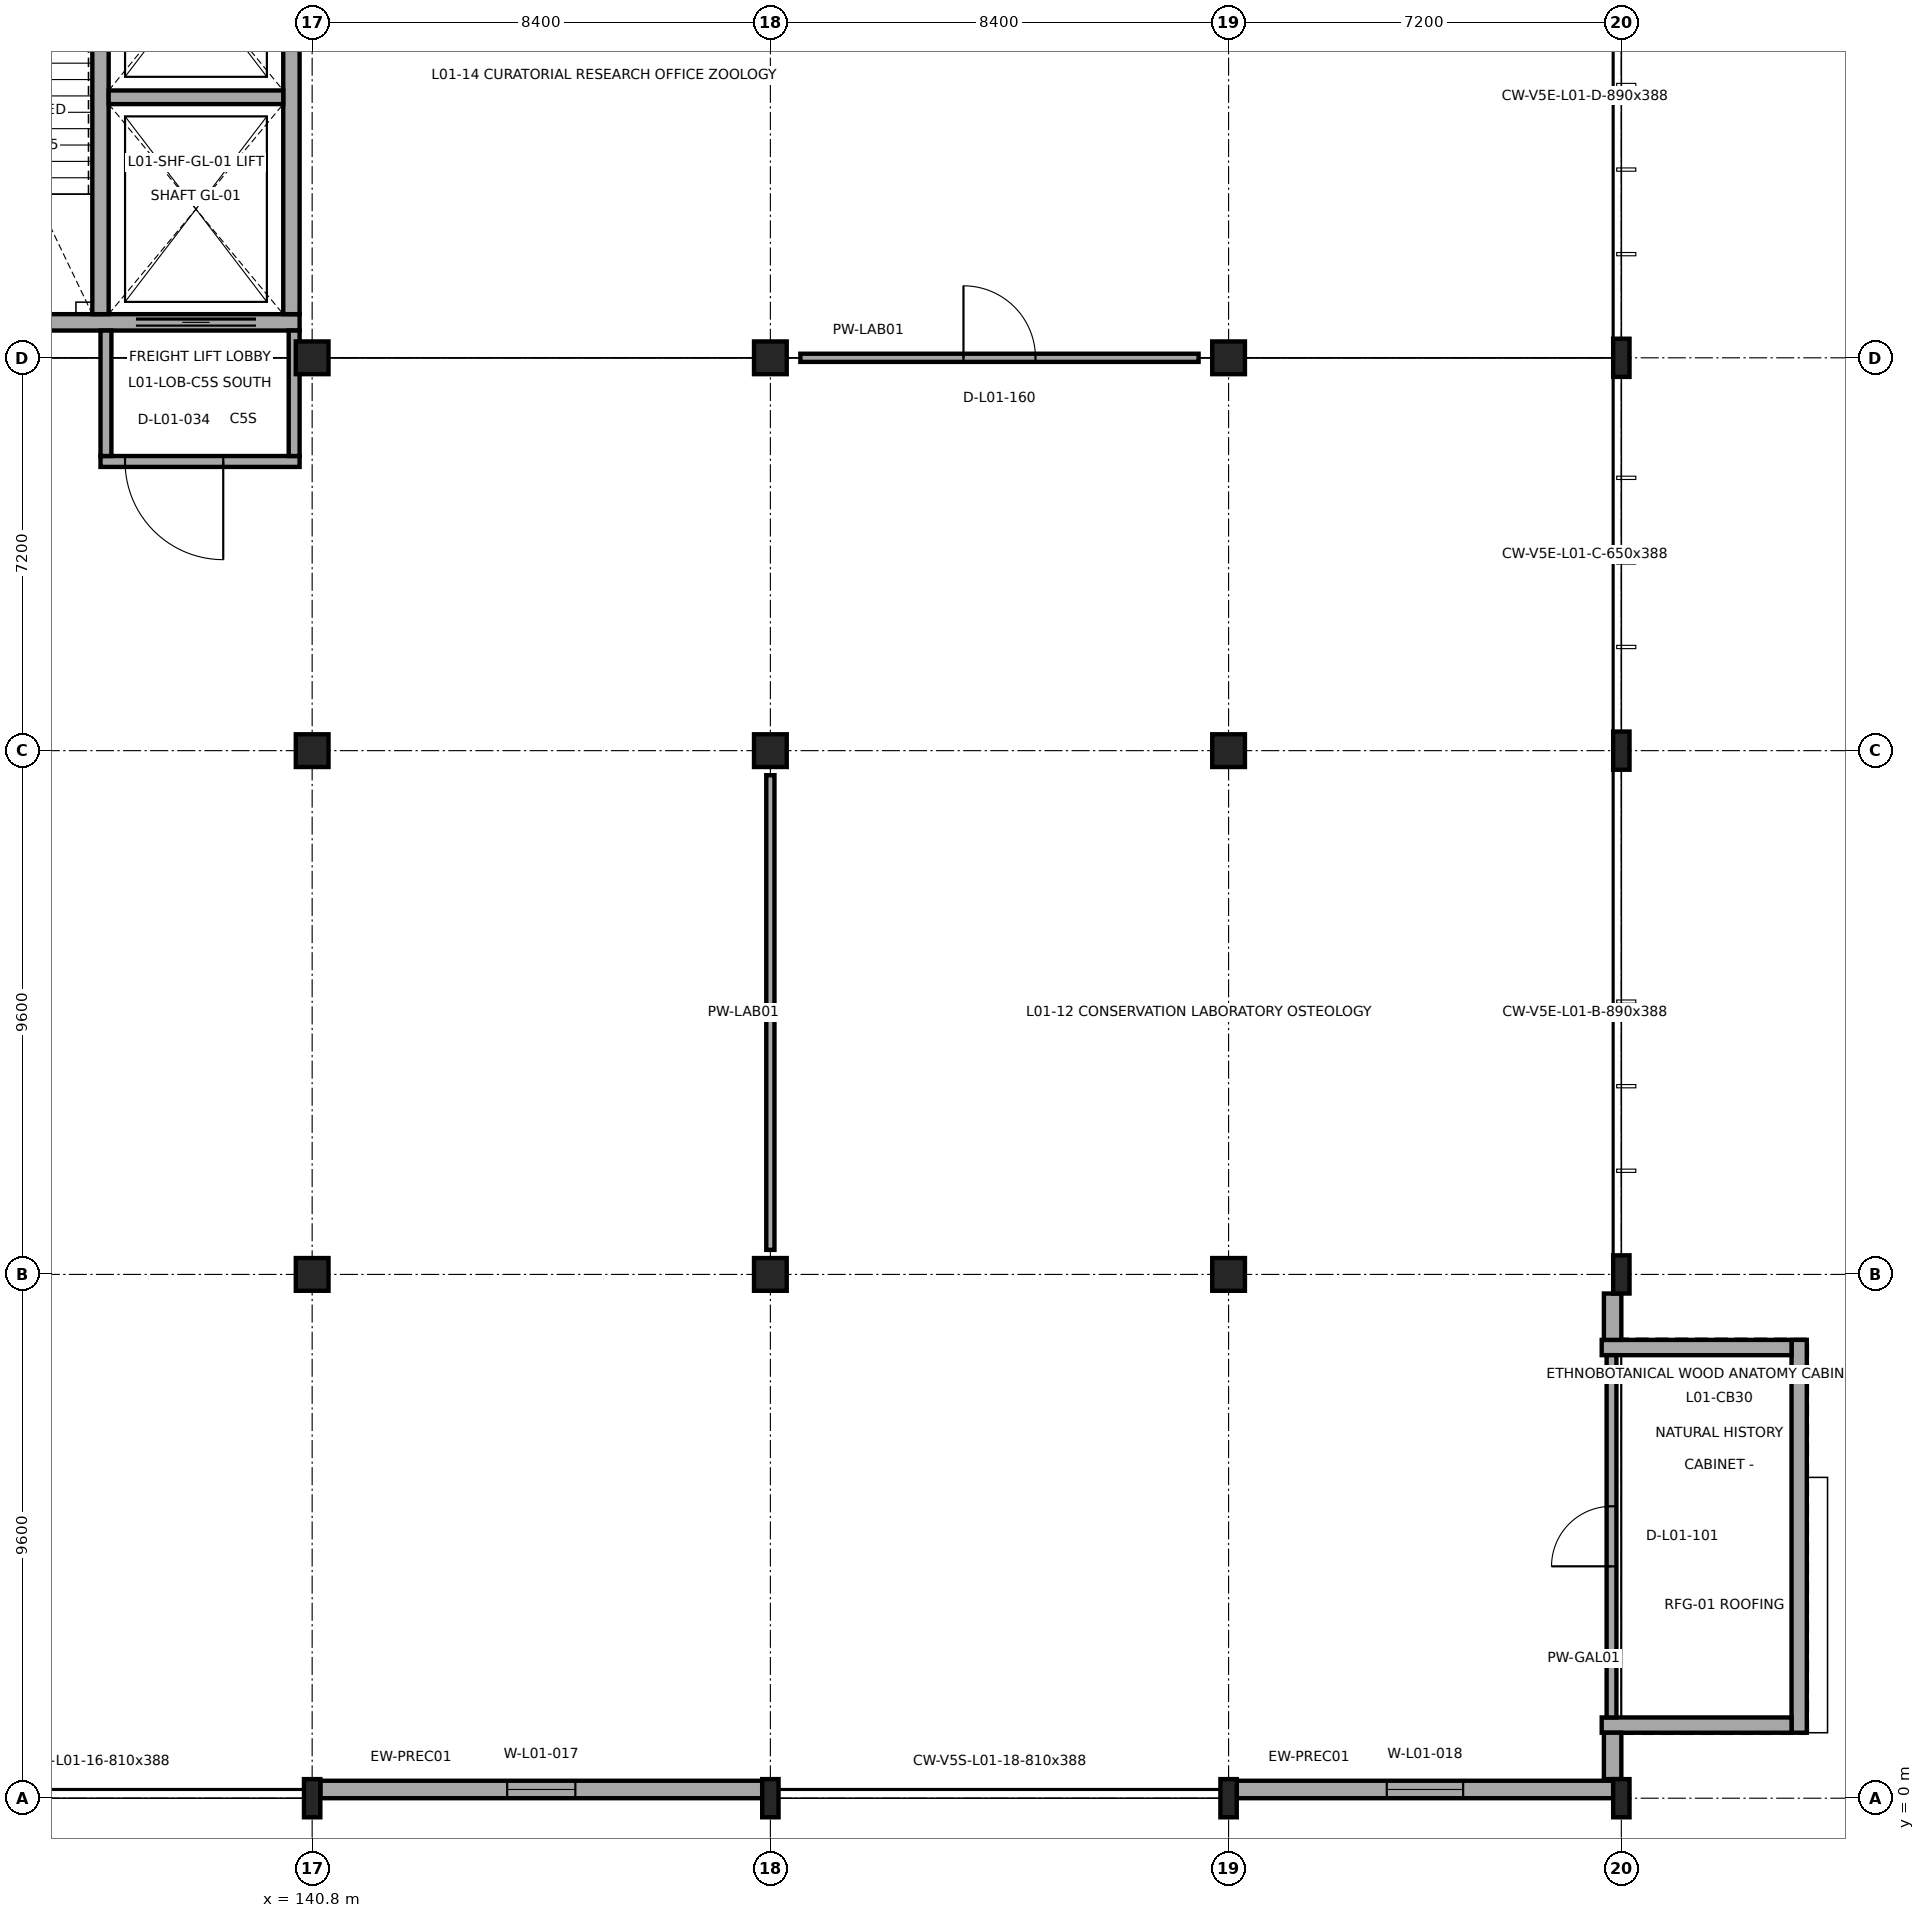
"""IFC4 building model, lengths in metres.
Left out: names, types, materials, properties, quantities, classifications, styles, units other than length and angle.
Written with IfcOpenShell. Run it as: python <this file> out.ifc"""

import sys

from ifc_helpers import new_model, si_unit, direction, frame, frame_2d, origin, origin_2d, place, context, subcontext, project, spatial, rectangle, i_section, extrude, element, fill, save


model = new_model("IFC4")
c1 = context("Model", 3, precision=1e-05, world=origin(), true_north=direction((0.0, 1.0)))
c2 = subcontext(c1, "Body", "Model", "MODEL_VIEW")
j1 = project(units=[si_unit("LENGTHUNIT", "METRE"), si_unit("PLANEANGLEUNIT", "RADIAN")], contexts=[c1])
p1 = place(None, origin())
s1 = spatial("IfcSite", under=j1, at=p1, CompositionType="ELEMENT")
p2 = place(p1, origin())
s2 = spatial("IfcBuilding", under=s1, at=p2, CompositionType="ELEMENT")
p3 = place(p2, frame((0.0, 0.0, 8.4)))
s3 = spatial("IfcBuildingStorey", under=s2, at=p3, CompositionType="ELEMENT", Elevation=8.4)
p4 = place(p3, frame((140.8, 0.0, 0.0), z_axis=(0.0, 0.0, 1.0), x_axis=(1.0, 0.0, 0.0)))
e1 = element("IfcColumn", 1, at=p4, inside=s3, PredefinedType="COLUMN", context=c2, shape_type="SweptSolid", body=[
    extrude(i_section(OverallWidth=0.3, OverallDepth=0.7, WebThickness=0.017, FlangeThickness=0.032, FilletRadius=0.027, at=origin_2d()), origin(), (0.0, 0.0, 1.0), 4.5),
])
for number, where, z_axis, x_axis in (
    (2, (140.8, 9.6, 0.0), (0.0, 0.0, 1.0), (1.0, 0.0, 0.0)),
    (3, (140.8, 19.2, 0.0), (0.0, 0.0, 1.0), (1.0, 0.0, 0.0)),
    (4, (140.8, 26.4, 0.0), (0.0, 0.0, 1.0), (1.0, 0.0, 0.0)),
):
    element("IfcColumn", number, at=place(p3, frame(where, z_axis=z_axis, x_axis=x_axis)), inside=s3, PredefinedType="COLUMN", context=c2, shape_type="SweptSolid", body=[
        extrude(rectangle(XDim=0.6, YDim=0.6, at=origin_2d()), origin(), (0.0, 0.0, 1.0), 4.5),
    ])
p5 = place(p3, frame((149.2, 0.0, 0.0), z_axis=(0.0, 0.0, 1.0), x_axis=(1.0, 0.0, 0.0)))
e5 = element("IfcColumn", 5, at=p5, inside=s3, PredefinedType="COLUMN", context=c2, shape_type="SweptSolid", body=[
    extrude(i_section(OverallWidth=0.3, OverallDepth=0.7, WebThickness=0.017, FlangeThickness=0.032, FilletRadius=0.027, at=origin_2d()), origin(), (0.0, 0.0, 1.0), 4.5),
])
for number, where, z_axis, x_axis in (
    (6, (149.2, 9.6, 0.0), (0.0, 0.0, 1.0), (1.0, 0.0, 0.0)),
    (7, (149.2, 19.2, 0.0), (0.0, 0.0, 1.0), (1.0, 0.0, 0.0)),
    (8, (149.2, 26.4, 0.0), (0.0, 0.0, 1.0), (1.0, 0.0, 0.0)),
):
    element("IfcColumn", number, at=place(p3, frame(where, z_axis=z_axis, x_axis=x_axis)), inside=s3, PredefinedType="COLUMN", context=c2, shape_type="SweptSolid", body=[
        extrude(rectangle(XDim=0.6, YDim=0.6, at=origin_2d()), origin(), (0.0, 0.0, 1.0), 4.5),
    ])
p6 = place(p3, frame((157.6, 0.0, 0.0), z_axis=(0.0, 0.0, 1.0), x_axis=(1.0, 0.0, 0.0)))
e9 = element("IfcColumn", 9, at=p6, inside=s3, PredefinedType="COLUMN", context=c2, shape_type="SweptSolid", body=[
    extrude(i_section(OverallWidth=0.3, OverallDepth=0.7, WebThickness=0.017, FlangeThickness=0.032, FilletRadius=0.027, at=origin_2d()), origin(), (0.0, 0.0, 1.0), 4.5),
])
for number, where, z_axis, x_axis in (
    (10, (157.6, 9.6, 0.0), (0.0, 0.0, 1.0), (1.0, 0.0, 0.0)),
    (11, (157.6, 19.2, 0.0), (0.0, 0.0, 1.0), (1.0, 0.0, 0.0)),
    (12, (157.6, 26.4, 0.0), (0.0, 0.0, 1.0), (1.0, 0.0, 0.0)),
):
    element("IfcColumn", number, at=place(p3, frame(where, z_axis=z_axis, x_axis=x_axis)), inside=s3, PredefinedType="COLUMN", context=c2, shape_type="SweptSolid", body=[
        extrude(rectangle(XDim=0.6, YDim=0.6, at=origin_2d()), origin(), (0.0, 0.0, 1.0), 4.5),
    ])
for number, where, z_axis, x_axis in (
    (13, (164.8, 0.0, 0.0), (0.0, 0.0, 1.0), (1.0, 0.0, 0.0)),
    (14, (164.8, 9.6, 0.0), (0.0, 0.0, 1.0), (1.0, 0.0, 0.0)),
    (15, (164.8, 19.2, 0.0), (0.0, 0.0, 1.0), (1.0, 0.0, 0.0)),
    (16, (164.8, 26.4, 0.0), (0.0, 0.0, 1.0), (1.0, 0.0, 0.0)),
):
    element("IfcColumn", number, at=place(p3, frame(where, z_axis=z_axis, x_axis=x_axis)), inside=s3, PredefinedType="COLUMN", context=c2, shape_type="SweptSolid", body=[
        extrude(i_section(OverallWidth=0.3, OverallDepth=0.7, WebThickness=0.017, FlangeThickness=0.032, FilletRadius=0.027, at=origin_2d()), origin(), (0.0, 0.0, 1.0), 4.5),
    ])
p7 = place(p3, frame((168.06, 1.2, 0.0), z_axis=(0.0, 0.0, 1.0), x_axis=(0.0, 1.0, 0.0)))
e17 = element("IfcWall", 17, at=p7, inside=s3, PredefinedType="SOLIDWALL", context=c2, shape_type="SweptSolid", body=[
    extrude(rectangle(XDim=7.2, YDim=0.28, at=frame_2d((3.6, 0.0))), origin(), (0.0, 0.0, 1.0), 2.99),
])
for number, where, z_axis, x_axis in (
    (18, (164.44, 1.34, 0.0), (0.0, 0.0, 1.0), (1.0, 0.0, 0.0)),
    (19, (167.92, 8.26, 0.0), (0.0, 0.0, 1.0), (-1.0, 0.0, 0.0)),
):
    element("IfcWall", number, at=place(p3, frame(where, z_axis=z_axis, x_axis=x_axis)), inside=s3, PredefinedType="SOLIDWALL", context=c2, shape_type="SweptSolid", body=[
        extrude(rectangle(XDim=3.48, YDim=0.28, at=frame_2d((1.74, 0.0))), origin(), (0.0, 0.0, 1.0), 2.99),
    ])
p8 = place(p3, frame((140.95, 0.16, 0.0), z_axis=(0.0, 0.0, 1.0), x_axis=(1.0, 0.0, 0.0)))
e20 = element("IfcWall", 20, at=p8, inside=s3, PredefinedType="SOLIDWALL", context=c2, shape_type="SweptSolid", body=[
    extrude(rectangle(XDim=8.1, YDim=0.32, at=frame_2d((4.05, 0.0))), origin(), (0.0, 0.0, 1.0), 3.88),
])
p9 = place(p8, frame((3.425, 0.0, 1.0)))
e21 = element("IfcOpeningElement", 21, at=p9, cuts=e20, PredefinedType="OPENING", context=c2, shape_type="SweptSolid", body=[
    extrude(rectangle(XDim=1.25, YDim=1.95, at=frame_2d((0.625, 0.975))), frame((0.0, 0.17, 0.0), z_axis=(0.0, -1.0, 0.0), x_axis=(1.0, 0.0, 0.0)), (0.0, 0.0, 1.0), 0.34),
])
p10 = place(p3, frame((157.75, 0.16, 0.0), z_axis=(0.0, 0.0, 1.0), x_axis=(1.0, 0.0, 0.0)))
e22 = element("IfcWall", 22, at=p10, inside=s3, PredefinedType="SOLIDWALL", context=c2, shape_type="SweptSolid", body=[
    extrude(rectangle(XDim=6.9, YDim=0.32, at=frame_2d((3.45, 0.0))), origin(), (0.0, 0.0, 1.0), 3.88),
])
p11 = place(p10, frame((2.75, 0.0, 1.0)))
e23 = element("IfcOpeningElement", 23, at=p11, cuts=e22, PredefinedType="OPENING", context=c2, shape_type="SweptSolid", body=[
    extrude(rectangle(XDim=1.4, YDim=1.75, at=frame_2d((0.7, 0.875))), frame((0.0, 0.17, 0.0), z_axis=(0.0, -1.0, 0.0), x_axis=(1.0, 0.0, 0.0)), (0.0, 0.0, 1.0), 0.34),
])
p12 = place(p3, frame((164.64, 0.35, 0.0), z_axis=(0.0, 0.0, 1.0), x_axis=(0.0, 1.0, 0.0)))
e24 = element("IfcWall", 24, at=p12, inside=s3, PredefinedType="SOLIDWALL", context=c2, shape_type="SweptSolid", body=[
    extrude(rectangle(XDim=0.85, YDim=0.32, at=frame_2d((0.425, 0.0))), origin(), (0.0, 0.0, 1.0), 3.88),
])
p13 = place(p3, frame((164.64, 8.4, 0.0), z_axis=(0.0, 0.0, 1.0), x_axis=(0.0, 1.0, 0.0)))
e25 = element("IfcWall", 25, at=p13, inside=s3, PredefinedType="SOLIDWALL", context=c2, shape_type="SweptSolid", body=[
    extrude(rectangle(XDim=0.85, YDim=0.32, at=frame_2d((0.425, 0.0))), origin(), (0.0, 0.0, 1.0), 3.88),
])
p14 = place(p3, frame((132.63, 27.05, 0.0), z_axis=(0.0, 0.0, 1.0), x_axis=(1.0, 0.0, 0.0)))
e26 = element("IfcWall", 26, at=p14, inside=s3, PredefinedType="SHEAR", context=c2, shape_type="SweptSolid", body=[
    extrude(rectangle(XDim=7.94, YDim=0.3, at=frame_2d((3.97, 0.0))), origin(), (0.0, 0.0, 1.0), 4.25),
])
p15 = place(p14, frame((4.94, 0.0, 0.0)))
e27 = element("IfcOpeningElement", 27, at=p15, cuts=e26, PredefinedType="OPENING", context=c2, shape_type="SweptSolid", body=[
    extrude(rectangle(XDim=2.2, YDim=2.6, at=frame_2d((1.1, 1.3))), frame((0.0, 0.16, 0.0), z_axis=(0.0, -1.0, 0.0), x_axis=(1.0, 0.0, 0.0)), (0.0, 0.0, 1.0), 0.32),
])
for number, where, z_axis, x_axis in (
    (28, (140.42, 27.2, 0.0), (0.0, 0.0, 1.0), (0.0, 1.0, 0.0)),
    (29, (136.92, 27.2, 0.0), (0.0, 0.0, 1.0), (0.0, 1.0, 0.0)),
):
    element("IfcWall", number, at=place(p3, frame(where, z_axis=z_axis, x_axis=x_axis)), inside=s3, PredefinedType="SHEAR", context=c2, shape_type="SweptSolid", body=[
        extrude(rectangle(XDim=8.0, YDim=0.3, at=frame_2d((4.0, 0.0))), origin(), (0.0, 0.0, 1.0), 4.25),
    ])
p16 = place(p3, frame((137.07, 31.175, 0.0), z_axis=(0.0, 0.0, 1.0), x_axis=(1.0, 0.0, 0.0)))
e30 = element("IfcWall", 30, at=p16, inside=s3, PredefinedType="SHEAR", context=c2, shape_type="SweptSolid", body=[
    extrude(rectangle(XDim=3.2, YDim=0.25, at=frame_2d((1.6, 0.0))), origin(), (0.0, 0.0, 1.0), 4.25),
])
p17 = place(p3, frame((140.57, 24.5, 0.0), z_axis=(0.0, 0.0, 1.0), x_axis=(-1.0, 0.0, 0.0)))
e31 = element("IfcWall", 31, at=p17, inside=s3, PredefinedType="SOLIDWALL", context=c2, shape_type="SweptSolid", body=[
    extrude(rectangle(XDim=3.65, YDim=0.2, at=frame_2d((1.825, 0.0))), origin(), (0.0, 0.0, 1.0), 4.235),
])
p18 = place(p17, frame((1.4, 0.0, 0.0)))
e32 = element("IfcOpeningElement", 32, at=p18, cuts=e31, PredefinedType="OPENING", context=c2, shape_type="SweptSolid", body=[
    extrude(rectangle(XDim=1.8, YDim=2.2, at=frame_2d((0.9, 1.1))), frame((0.0, 0.11, 0.0), z_axis=(0.0, -1.0, 0.0), x_axis=(1.0, 0.0, 0.0)), (0.0, 0.0, 1.0), 0.22),
])
for number, where, z_axis, x_axis in (
    (33, (137.02, 24.6, 0.0), (0.0, 0.0, 1.0), (0.0, 1.0, 0.0)),
    (34, (140.47, 26.9, 0.0), (0.0, 0.0, 1.0), (0.0, -1.0, 0.0)),
):
    element("IfcWall", number, at=place(p3, frame(where, z_axis=z_axis, x_axis=x_axis)), inside=s3, PredefinedType="SOLIDWALL", context=c2, shape_type="SweptSolid", body=[
        extrude(rectangle(XDim=2.3, YDim=0.2, at=frame_2d((1.15, 0.0))), origin(), (0.0, 0.0, 1.0), 3.682),
    ])
p19 = place(p3, frame((164.62, 1.48, 0.0), z_axis=(0.0, 0.0, 1.0), x_axis=(0.0, 1.0, 0.0)))
e35 = element("IfcWall", 35, at=p19, inside=s3, PredefinedType="PARTITIONING", context=c2, shape_type="SweptSolid", body=[
    extrude(rectangle(XDim=6.64, YDim=0.18, at=frame_2d((3.32, 0.0))), origin(), (0.0, 0.0, 1.0), 2.99),
])
p20 = place(p19, frame((2.77, 0.0, 0.0)))
e36 = element("IfcOpeningElement", 36, at=p20, cuts=e35, PredefinedType="OPENING", context=c2, shape_type="SweptSolid", body=[
    extrude(rectangle(XDim=1.1, YDim=2.2, at=frame_2d((0.55, 1.1))), frame((0.0, 0.1, 0.0), z_axis=(0.0, -1.0, 0.0), x_axis=(1.0, 0.0, 0.0)), (0.0, 0.0, 1.0), 0.2),
])
p21 = place(p3, frame((149.2, 10.05, 0.0), z_axis=(0.0, 0.0, 1.0), x_axis=(0.0, 1.0, 0.0)))
e37 = element("IfcWall", 37, at=p21, inside=s3, PredefinedType="PARTITIONING", context=c2, shape_type="SweptSolid", body=[
    extrude(rectangle(XDim=8.7, YDim=0.15, at=frame_2d((4.35, 0.0))), origin(), (0.0, 0.0, 1.0), 3.632),
])
p22 = place(p3, frame((149.75, 26.4, 0.0), z_axis=(0.0, 0.0, 1.0), x_axis=(1.0, 0.0, 0.0)))
e38 = element("IfcWall", 38, at=p22, inside=s3, PredefinedType="PARTITIONING", context=c2, shape_type="SweptSolid", body=[
    extrude(rectangle(XDim=7.3, YDim=0.15, at=frame_2d((3.65, 0.0))), origin(), (0.0, 0.0, 1.0), 3.682),
])
p23 = place(p22, frame((2.99, 0.0, 0.0)))
e39 = element("IfcOpeningElement", 39, at=p23, cuts=e38, PredefinedType="OPENING", context=c2, shape_type="SweptSolid", body=[
    extrude(rectangle(XDim=1.32, YDim=2.2, at=frame_2d((0.66, 1.1))), frame((0.0, 0.085, 0.0), z_axis=(0.0, -1.0, 0.0), x_axis=(1.0, 0.0, 0.0)), (0.0, 0.0, 1.0), 0.17),
])
p24 = place(p9, origin())
e40 = element("IfcWindow", 40, at=p24, inside=s3, PartitioningType="SINGLE_PANEL", PredefinedType="WINDOW", context=c2, shape_type="SweptSolid", body=[
    extrude(rectangle(XDim=1.25, YDim=1.95, at=frame_2d((0.625, 0.975))), frame((0.0, 0.03, 0.0), z_axis=(0.0, -1.0, 0.0), x_axis=(1.0, 0.0, 0.0)), (0.0, 0.0, 1.0), 0.06),
])
fill(e21, e40)
p25 = place(p11, origin())
e41 = element("IfcWindow", 41, at=p25, inside=s3, PartitioningType="SINGLE_PANEL", PredefinedType="WINDOW", context=c2, shape_type="SweptSolid", body=[
    extrude(rectangle(XDim=1.4, YDim=1.75, at=frame_2d((0.7, 0.875))), frame((0.0, 0.03, 0.0), z_axis=(0.0, -1.0, 0.0), x_axis=(1.0, 0.0, 0.0)), (0.0, 0.0, 1.0), 0.06),
])
fill(e23, e41)
p26 = place(p15, origin())
e42 = element("IfcDoor", 42, at=p26, inside=s3, OperationType="SLIDING_TO_LEFT", PredefinedType="DOOR", context=c2, shape_type="SweptSolid", body=[
    extrude(rectangle(XDim=2.2, YDim=2.6, at=frame_2d((1.1, 1.3))), frame((0.0, 0.025, 0.0), z_axis=(0.0, -1.0, 0.0), x_axis=(1.0, 0.0, 0.0)), (0.0, 0.0, 1.0), 0.05),
])
fill(e27, e42)
p27 = place(p18, origin())
e43 = element("IfcDoor", 43, at=p27, inside=s3, OperationType="DOUBLE_DOOR_SINGLE_SWING", PredefinedType="DOOR", context=c2, shape_type="SweptSolid", body=[
    extrude(rectangle(XDim=1.8, YDim=2.2, at=frame_2d((0.9, 1.1))), frame((0.0, 0.025, 0.0), z_axis=(0.0, -1.0, 0.0), x_axis=(1.0, 0.0, 0.0)), (0.0, 0.0, 1.0), 0.05),
])
fill(e32, e43)
p28 = place(p20, origin())
e44 = element("IfcDoor", 44, at=p28, inside=s3, OperationType="SINGLE_SWING_LEFT", PredefinedType="DOOR", context=c2, shape_type="SweptSolid", body=[
    extrude(rectangle(XDim=1.1, YDim=2.2, at=frame_2d((0.55, 1.1))), frame((0.0, 0.025, 0.0), z_axis=(0.0, -1.0, 0.0), x_axis=(1.0, 0.0, 0.0)), (0.0, 0.0, 1.0), 0.05),
])
fill(e36, e44)
p29 = place(p23, origin())
e45 = element("IfcDoor", 45, at=p29, inside=s3, OperationType="SINGLE_SWING_LEFT", PredefinedType="DOOR", context=c2, shape_type="SweptSolid", body=[
    extrude(rectangle(XDim=1.32, YDim=2.2, at=frame_2d((0.66, 1.1))), frame((0.0, 0.025, 0.0), z_axis=(0.0, -1.0, 0.0), x_axis=(1.0, 0.0, 0.0)), (0.0, 0.0, 1.0), 0.05),
])
fill(e39, e45)
save(model, sys.argv[1])
